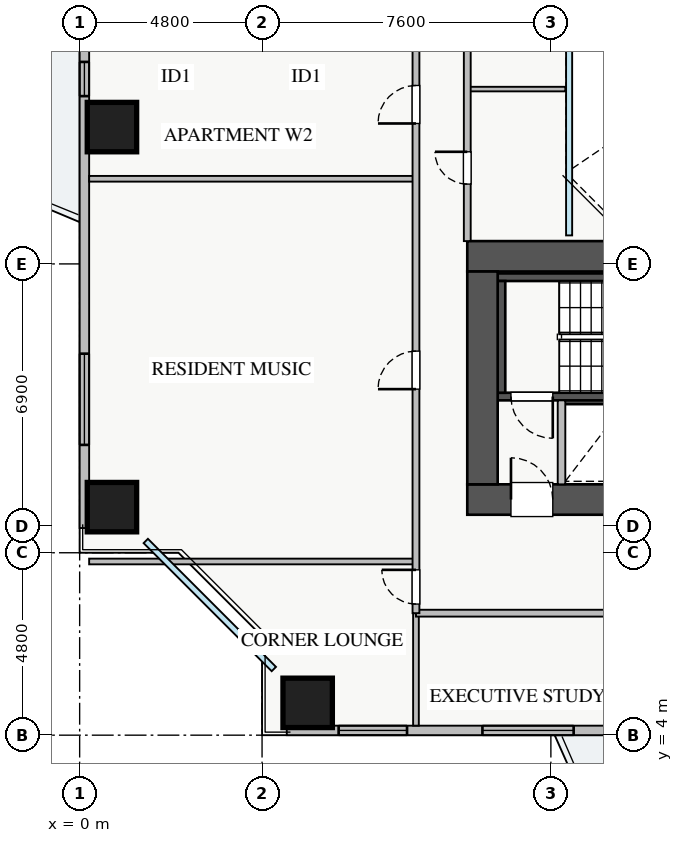
"""IFC4 building model, lengths in metres.
Left out: names, types, materials, properties, quantities, classifications, styles, units other than length and angle.
Written with IfcOpenShell. Run it as: python <this file> out.ifc"""

import sys

from ifc_helpers import new_model, si_unit, direction, frame, frame_2d, origin, origin_2d, place, context, subcontext, project, spatial, rectangle, extrude, source, transform, mapped, element, fill, save


model = new_model("IFC4")
c1 = context("Model", 3, precision=1e-05, world=origin(), true_north=direction((0.0, 1.0)))
c2 = subcontext(c1, "Body", "Model", "MODEL_VIEW")
j1 = project(units=[si_unit("LENGTHUNIT", "METRE"), si_unit("PLANEANGLEUNIT", "RADIAN")], contexts=[c1])
p1 = place(None, origin())
s1 = spatial("IfcSite", under=j1, at=p1, CompositionType="ELEMENT")
p2 = place(p1, origin())
s2 = spatial("IfcBuilding", under=s1, at=p2, CompositionType="ELEMENT")
p3 = place(p2, frame((0.0, 0.0, 82.75)))
s3 = spatial("IfcBuildingStorey", under=s2, at=p3, CompositionType="ELEMENT", Elevation=82.75)
p4 = place(p3, frame((12.68, 12.8, 0.0), z_axis=(0.0, 0.0, 1.0), x_axis=(1.0, 0.0, 0.0)))
e1 = element("IfcWall", 1, at=p4, inside=s3, PredefinedType="SHEAR", context=c2, shape_type="SweptSolid", body=[
    extrude(rectangle(XDim=1.94, YDim=0.18, at=frame_2d((0.97, 0.0))), origin(), (0.0, 0.0, 1.0), 3.07),
])
p5 = place(p3, frame((11.0, 12.91, 0.0), z_axis=(0.0, 0.0, 1.0), x_axis=(1.0, 0.0, 0.0)))
e2 = element("IfcWall", 2, at=p5, inside=s3, PredefinedType="SHEAR", context=c2, shape_type="SweptSolid", body=[
    extrude(rectangle(XDim=7.15, YDim=0.2, at=frame_2d((3.575, 0.0))), origin(), (0.0, 0.0, 1.0), 3.25),
])
p6 = place(p5, frame((0.35, 0.0, 0.0)))
e3 = element("IfcOpeningElement", 3, at=p6, cuts=e2, PredefinedType="OPENING", context=c2, shape_type="SweptSolid", body=[
    extrude(rectangle(XDim=1.1, YDim=2.05, at=frame_2d((0.55, 1.025))), frame((0.0, 0.11, 0.0), z_axis=(0.0, -1.0, 0.0), x_axis=(1.0, 0.0, 0.0)), (0.0, 0.0, 1.0), 0.22),
])
p7 = place(p3, frame((11.0, 16.05, 0.0), z_axis=(0.0, 0.0, 1.0), x_axis=(1.0, 0.0, 0.0)))
e4 = element("IfcWall", 4, at=p7, inside=s3, PredefinedType="SHEAR", context=c2, shape_type="SweptSolid", body=[
    extrude(rectangle(XDim=7.15, YDim=0.2, at=frame_2d((3.575, 0.0))), origin(), (0.0, 0.0, 1.0), 3.25),
])
p8 = place(p3, frame((11.1, 13.01, 0.0), z_axis=(0.0, 0.0, 1.0), x_axis=(0.0, 1.0, 0.0)))
e5 = element("IfcWall", 5, at=p8, inside=s3, PredefinedType="SHEAR", context=c2, shape_type="SweptSolid", body=[
    extrude(rectangle(XDim=2.94, YDim=0.2, at=frame_2d((1.47, 0.0))), origin(), (0.0, 0.0, 1.0), 3.25),
])
p9 = place(p3, frame((10.2, 10.2, 0.0), z_axis=(0.0, 0.0, 1.0), x_axis=(1.0, 0.0, 0.0)))
e6 = element("IfcWall", 6, at=p9, inside=s3, PredefinedType="SHEAR", context=c2, shape_type="SweptSolid", body=[
    extrude(rectangle(XDim=17.6, YDim=0.8, at=frame_2d((8.8, 0.0))), origin(), (0.0, 0.0, 1.0), 3.25),
])
p10 = place(p9, frame((1.15, 0.0, 0.0)))
e7 = element("IfcOpeningElement", 7, at=p10, cuts=e6, PredefinedType="OPENING", context=c2, shape_type="SweptSolid", body=[
    extrude(rectangle(XDim=1.1, YDim=2.05, at=frame_2d((0.55, 1.025))), frame((0.0, 0.41, 0.0), z_axis=(0.0, -1.0, 0.0), x_axis=(1.0, 0.0, 0.0)), (0.0, 0.0, 1.0), 0.82),
])
p11 = place(p9, frame((8.3, 0.0, 0.0)))
e8 = element("IfcOpeningElement", 8, at=p11, cuts=e6, PredefinedType="OPENING", context=c2, shape_type="SweptSolid", body=[
    extrude(rectangle(XDim=1.1, YDim=2.05, at=frame_2d((0.55, 1.025))), frame((0.0, 0.41, 0.0), z_axis=(0.0, -1.0, 0.0), x_axis=(1.0, 0.0, 0.0)), (0.0, 0.0, 1.0), 0.82),
])
p12 = place(p9, frame((10.05, 0.0, 0.0)))
e9 = element("IfcOpeningElement", 9, at=p12, cuts=e6, PredefinedType="OPENING", context=c2, shape_type="SweptSolid", body=[
    extrude(rectangle(XDim=1.1, YDim=2.05, at=frame_2d((0.55, 1.025))), frame((0.0, 0.41, 0.0), z_axis=(0.0, -1.0, 0.0), x_axis=(1.0, 0.0, 0.0)), (0.0, 0.0, 1.0), 0.82),
])
p13 = place(p9, frame((14.74, 0.0, 0.0)))
e10 = element("IfcOpeningElement", 10, at=p13, cuts=e6, PredefinedType="OPENING", context=c2, shape_type="SweptSolid", body=[
    extrude(rectangle(XDim=1.0, YDim=2.05, at=frame_2d((0.5, 1.025))), frame((0.0, 0.41, 0.0), z_axis=(0.0, -1.0, 0.0), x_axis=(1.0, 0.0, 0.0)), (0.0, 0.0, 1.0), 0.82),
])
p14 = place(p9, frame((11.835, 0.0, 0.0)))
e11 = element("IfcOpeningElement", 11, at=p14, cuts=e6, PredefinedType="OPENING", context=c2, shape_type="SweptSolid", body=[
    extrude(rectangle(XDim=1.0, YDim=2.05, at=frame_2d((0.5, 1.025))), frame((0.0, 0.41, 0.0), z_axis=(0.0, -1.0, 0.0), x_axis=(1.0, 0.0, 0.0)), (0.0, 0.0, 1.0), 0.82),
])
p15 = place(p9, frame((13.37, 0.0, 0.0)))
e12 = element("IfcOpeningElement", 12, at=p15, cuts=e6, PredefinedType="OPENING", context=c2, shape_type="SweptSolid", body=[
    extrude(rectangle(XDim=1.0, YDim=2.05, at=frame_2d((0.5, 1.025))), frame((0.0, 0.41, 0.0), z_axis=(0.0, -1.0, 0.0), x_axis=(1.0, 0.0, 0.0)), (0.0, 0.0, 1.0), 0.82),
])
p16 = place(p3, frame((10.2, 16.6, 0.0), z_axis=(0.0, 0.0, 1.0), x_axis=(1.0, 0.0, 0.0)))
e13 = element("IfcWall", 13, at=p16, inside=s3, PredefinedType="SHEAR", context=c2, shape_type="SweptSolid", body=[
    extrude(rectangle(XDim=17.6, YDim=0.8, at=frame_2d((8.8, 0.0))), origin(), (0.0, 0.0, 1.0), 3.25),
])
p17 = place(p3, frame((10.6, 10.6, 0.0), z_axis=(0.0, 0.0, 1.0), x_axis=(0.0, 1.0, 0.0)))
e14 = element("IfcWall", 14, at=p17, inside=s3, PredefinedType="SHEAR", context=c2, shape_type="SweptSolid", body=[
    extrude(rectangle(XDim=5.6, YDim=0.8, at=frame_2d((2.8, 0.0))), origin(), (0.0, 0.0, 1.0), 3.25),
])
m1 = source(origin(), c2, "Body", "SweptSolid", [
    extrude(rectangle(XDim=1.3, YDim=1.3, at=origin_2d()), origin(), (0.0, 0.0, 1.0), 3.25),
])
for number, where, z_axis, x_axis in (
    (15, (6.0, 4.85, 0.0), (0.0, 0.0, 1.0), (1.0, 0.0, 0.0)),
    (16, (0.85, 20.0, 0.0), (0.0, 0.0, 1.0), (1.0, 0.0, 0.0)),
    (17, (0.85, 10.0, 0.0), (0.0, 0.0, 1.0), (1.0, 0.0, 0.0)),
):
    element("IfcColumn", number, at=place(p3, frame(where, z_axis=z_axis, x_axis=x_axis)), inside=s3, PredefinedType="COLUMN", context=c2, shape_type="MappedRepresentation", body=[
        mapped(m1, transform((0.0, 0.0, 0.0), x_axis=(1.0, 0.0, 0.0), y_axis=(0.0, 1.0, 0.0), z_axis=(0.0, 0.0, 1.0), scale=1.0)),
    ])
p18 = place(p3, frame((5.45, 4.125, 0.0), z_axis=(0.0, 0.0, 1.0), x_axis=(1.0, 0.0, 0.0)))
e18 = element("IfcWall", 18, at=p18, inside=s3, PredefinedType="STANDARD", context=c2, shape_type="SweptSolid", body=[
    extrude(rectangle(XDim=27.1, YDim=0.25, at=frame_2d((13.55, 0.0))), origin(), (0.0, 0.0, 1.0), 2.61),
])
p19 = place(p18, frame((14.4, 0.0, 0.0)))
e19 = element("IfcOpeningElement", 19, at=p19, cuts=e18, PredefinedType="OPENING", context=c2, shape_type="SweptSolid", body=[
    extrude(rectangle(XDim=1.2, YDim=2.1, at=frame_2d((0.6, 1.05))), frame((0.0, 0.135, 0.0), z_axis=(0.0, -1.0, 0.0), x_axis=(1.0, 0.0, 0.0)), (0.0, 0.0, 1.0), 0.27),
])
p20 = place(p18, frame((1.365, 0.0, 0.9)))
e20 = element("IfcOpeningElement", 20, at=p20, cuts=e18, PredefinedType="OPENING", context=c2, shape_type="SweptSolid", body=[
    extrude(rectangle(XDim=1.8, YDim=1.5, at=frame_2d((0.9, 0.75))), frame((0.0, 0.135, 0.0), z_axis=(0.0, -1.0, 0.0), x_axis=(1.0, 0.0, 0.0)), (0.0, 0.0, 1.0), 0.27),
])
p21 = place(p18, frame((9.263, 0.0, 0.9)))
e21 = element("IfcOpeningElement", 21, at=p21, cuts=e18, PredefinedType="OPENING", context=c2, shape_type="SweptSolid", body=[
    extrude(rectangle(XDim=1.8, YDim=1.45, at=frame_2d((0.9, 0.725))), frame((0.0, 0.135, 0.0), z_axis=(0.0, -1.0, 0.0), x_axis=(1.0, 0.0, 0.0)), (0.0, 0.0, 1.0), 0.27),
])
p22 = place(p18, frame((18.774, 0.0, 0.9)))
e22 = element("IfcOpeningElement", 22, at=p22, cuts=e18, PredefinedType="OPENING", context=c2, shape_type="SweptSolid", body=[
    extrude(rectangle(XDim=1.5, YDim=1.5, at=frame_2d((0.75, 0.75))), frame((0.0, 0.135, 0.0), z_axis=(0.0, -1.0, 0.0), x_axis=(1.0, 0.0, 0.0)), (0.0, 0.0, 1.0), 0.27),
])
p23 = place(p18, frame((22.663, 0.0, 0.9)))
e23 = element("IfcOpeningElement", 23, at=p23, cuts=e18, PredefinedType="OPENING", context=c2, shape_type="SweptSolid", body=[
    extrude(rectangle(XDim=2.1, YDim=1.48, at=frame_2d((1.05, 0.74))), frame((0.0, 0.135, 0.0), z_axis=(0.0, -1.0, 0.0), x_axis=(1.0, 0.0, 0.0)), (0.0, 0.0, 1.0), 0.27),
])
p24 = place(p18, frame((5.149, 0.0, 0.9)))
e24 = element("IfcOpeningElement", 24, at=p24, cuts=e18, PredefinedType="OPENING", context=c2, shape_type="SweptSolid", body=[
    extrude(rectangle(XDim=2.4, YDim=1.5, at=frame_2d((1.2, 0.75))), frame((0.0, 0.135, 0.0), z_axis=(0.0, -1.0, 0.0), x_axis=(1.0, 0.0, 0.0)), (0.0, 0.0, 1.0), 0.27),
])
p25 = place(p3, frame((0.125, 9.45, 0.0), z_axis=(0.0, 0.0, 1.0), x_axis=(0.0, 1.0, 0.0)))
e25 = element("IfcWall", 25, at=p25, inside=s3, PredefinedType="STANDARD", context=c2, shape_type="SweptSolid", body=[
    extrude(rectangle(XDim=27.1, YDim=0.25, at=frame_2d((13.55, 0.0))), origin(), (0.0, 0.0, 1.0), 2.61),
])
p26 = place(p25, frame((14.4, 0.0, 0.0)))
e26 = element("IfcOpeningElement", 26, at=p26, cuts=e25, PredefinedType="OPENING", context=c2, shape_type="SweptSolid", body=[
    extrude(rectangle(XDim=1.2, YDim=2.1, at=frame_2d((0.6, 1.05))), frame((0.0, 0.135, 0.0), z_axis=(0.0, -1.0, 0.0), x_axis=(1.0, 0.0, 0.0)), (0.0, 0.0, 1.0), 0.27),
])
p27 = place(p25, frame((2.188, 0.0, 0.9)))
e27 = element("IfcOpeningElement", 27, at=p27, cuts=e25, PredefinedType="OPENING", context=c2, shape_type="SweptSolid", body=[
    extrude(rectangle(XDim=2.4, YDim=1.48, at=frame_2d((1.2, 0.74))), frame((0.0, 0.135, 0.0), z_axis=(0.0, -1.0, 0.0), x_axis=(1.0, 0.0, 0.0)), (0.0, 0.0, 1.0), 0.27),
])
p28 = place(p25, frame((23.272, 0.0, 0.9)))
e28 = element("IfcOpeningElement", 28, at=p28, cuts=e25, PredefinedType="OPENING", context=c2, shape_type="SweptSolid", body=[
    extrude(rectangle(XDim=2.1, YDim=1.5, at=frame_2d((1.05, 0.75))), frame((0.0, 0.135, 0.0), z_axis=(0.0, -1.0, 0.0), x_axis=(1.0, 0.0, 0.0)), (0.0, 0.0, 1.0), 0.27),
])
p29 = place(p25, frame((11.365, 0.0, 0.9)))
e29 = element("IfcOpeningElement", 29, at=p29, cuts=e25, PredefinedType="OPENING", context=c2, shape_type="SweptSolid", body=[
    extrude(rectangle(XDim=0.9, YDim=1.2, at=frame_2d((0.45, 0.6))), frame((0.0, 0.135, 0.0), z_axis=(0.0, -1.0, 0.0), x_axis=(1.0, 0.0, 0.0)), (0.0, 0.0, 1.0), 0.27),
])
p30 = place(p25, frame((18.365, 0.0, 0.9)))
e30 = element("IfcOpeningElement", 30, at=p30, cuts=e25, PredefinedType="OPENING", context=c2, shape_type="SweptSolid", body=[
    extrude(rectangle(XDim=0.9, YDim=1.2, at=frame_2d((0.45, 0.6))), frame((0.0, 0.135, 0.0), z_axis=(0.0, -1.0, 0.0), x_axis=(1.0, 0.0, 0.0)), (0.0, 0.0, 1.0), 0.27),
])
p31 = place(p3, frame((12.68, 10.6, 0.0), z_axis=(0.0, 0.0, 1.0), x_axis=(0.0, 1.0, 0.0)))
e31 = element("IfcWall", 31, at=p31, inside=s3, PredefinedType="PARTITIONING", context=c2, shape_type="SweptSolid", body=[
    extrude(rectangle(XDim=2.21, YDim=0.2, at=frame_2d((1.105, 0.0))), origin(), (0.0, 0.0, 1.0), 3.07),
])
p32 = place(p3, frame((8.85, 4.25, 0.0), z_axis=(0.0, 0.0, 1.0), x_axis=(0.0, 1.0, 0.0)))
e32 = element("IfcWall", 32, at=p32, inside=s3, PredefinedType="PARTITIONING", context=c2, shape_type="SweptSolid", body=[
    extrude(rectangle(XDim=2.96, YDim=0.15, at=frame_2d((1.48, 0.0))), origin(), (0.0, 0.0, 1.0), 3.07),
])
p33 = place(p3, frame((8.85, 7.21, 0.0), z_axis=(0.0, 0.0, 1.0), x_axis=(1.0, 0.0, 0.0)))
e33 = element("IfcWall", 33, at=p33, inside=s3, PredefinedType="PARTITIONING", context=c2, shape_type="SweptSolid", body=[
    extrude(rectangle(XDim=23.57, YDim=0.18, at=frame_2d((11.785, 0.0))), origin(), (0.0, 0.0, 1.0), 3.07),
])
p34 = place(p33, frame((5.975, 0.0, 0.0)))
e34 = element("IfcOpeningElement", 34, at=p34, cuts=e33, PredefinedType="OPENING", context=c2, shape_type="SweptSolid", body=[
    extrude(rectangle(XDim=1.0, YDim=2.05, at=frame_2d((0.5, 1.025))), frame((0.0, 0.1, 0.0), z_axis=(0.0, -1.0, 0.0), x_axis=(1.0, 0.0, 0.0)), (0.0, 0.0, 1.0), 0.2),
])
p35 = place(p33, frame((17.76, 0.0, 0.0)))
e35 = element("IfcOpeningElement", 35, at=p35, cuts=e33, PredefinedType="OPENING", context=c2, shape_type="SweptSolid", body=[
    extrude(rectangle(XDim=1.0, YDim=2.05, at=frame_2d((0.5, 1.025))), frame((0.0, 0.1, 0.0), z_axis=(0.0, -1.0, 0.0), x_axis=(1.0, 0.0, 0.0)), (0.0, 0.0, 1.0), 0.2),
])
for number, where, z_axis, x_axis in (
    (36, (0.25, 8.57, 0.0), (0.0, 0.0, 1.0), (1.0, 0.0, 0.0)),
    (37, (0.25, 18.64, 0.0), (0.0, 0.0, 1.0), (1.0, 0.0, 0.0)),
):
    element("IfcWall", number, at=place(p3, frame(where, z_axis=z_axis, x_axis=x_axis)), inside=s3, PredefinedType="PARTITIONING", context=c2, shape_type="SweptSolid", body=[
        extrude(rectangle(XDim=8.6, YDim=0.15, at=frame_2d((4.3, 0.0))), origin(), (0.0, 0.0, 1.0), 3.07),
    ])
p36 = place(p3, frame((8.85, 7.21, 0.0), z_axis=(0.0, 0.0, 1.0), x_axis=(0.0, 1.0, 0.0)))
e38 = element("IfcWall", 38, at=p36, inside=s3, PredefinedType="PARTITIONING", context=c2, shape_type="SweptSolid", body=[
    extrude(rectangle(XDim=31.23, YDim=0.18, at=frame_2d((15.615, 0.0))), origin(), (0.0, 0.0, 1.0), 3.07),
])
p37 = place(p36, frame((30.09, 0.0, 0.0)))
e39 = element("IfcOpeningElement", 39, at=p37, cuts=e38, PredefinedType="OPENING", context=c2, shape_type="SweptSolid", body=[
    extrude(rectangle(XDim=0.9, YDim=2.05, at=frame_2d((0.45, 1.025))), frame((0.0, 0.1, 0.0), z_axis=(0.0, -1.0, 0.0), x_axis=(1.0, 0.0, 0.0)), (0.0, 0.0, 1.0), 0.2),
])
p38 = place(p36, frame((0.24, 0.0, 0.0)))
e40 = element("IfcOpeningElement", 40, at=p38, cuts=e38, PredefinedType="OPENING", context=c2, shape_type="SweptSolid", body=[
    extrude(rectangle(XDim=0.9, YDim=2.05, at=frame_2d((0.45, 1.025))), frame((0.0, 0.1, 0.0), z_axis=(0.0, -1.0, 0.0), x_axis=(1.0, 0.0, 0.0)), (0.0, 0.0, 1.0), 0.2),
])
p39 = place(p36, frame((5.895, 0.0, 0.0)))
e41 = element("IfcOpeningElement", 41, at=p39, cuts=e38, PredefinedType="OPENING", context=c2, shape_type="SweptSolid", body=[
    extrude(rectangle(XDim=1.0, YDim=2.05, at=frame_2d((0.5, 1.025))), frame((0.0, 0.1, 0.0), z_axis=(0.0, -1.0, 0.0), x_axis=(1.0, 0.0, 0.0)), (0.0, 0.0, 1.0), 0.2),
])
p40 = place(p36, frame((12.885, 0.0, 0.0)))
e42 = element("IfcOpeningElement", 42, at=p40, cuts=e38, PredefinedType="OPENING", context=c2, shape_type="SweptSolid", body=[
    extrude(rectangle(XDim=1.0, YDim=2.05, at=frame_2d((0.5, 1.025))), frame((0.0, 0.1, 0.0), z_axis=(0.0, -1.0, 0.0), x_axis=(1.0, 0.0, 0.0)), (0.0, 0.0, 1.0), 0.2),
])
p41 = place(p36, frame((21.96, 0.0, 0.0)))
e43 = element("IfcOpeningElement", 43, at=p41, cuts=e38, PredefinedType="OPENING", context=c2, shape_type="SweptSolid", body=[
    extrude(rectangle(XDim=1.0, YDim=2.05, at=frame_2d((0.5, 1.025))), frame((0.0, 0.1, 0.0), z_axis=(0.0, -1.0, 0.0), x_axis=(1.0, 0.0, 0.0)), (0.0, 0.0, 1.0), 0.2),
])
p42 = place(p3, frame((10.2, 21.0, 0.0), z_axis=(0.0, 0.0, 1.0), x_axis=(1.0, 0.0, 0.0)))
e44 = element("IfcWall", 44, at=p42, inside=s3, PredefinedType="PLUMBINGWALL", context=c2, shape_type="SweptSolid", body=[
    extrude(rectangle(XDim=2.58, YDim=0.12, at=frame_2d((1.29, 0.0))), origin(), (0.0, 0.0, 1.0), 3.07),
])
p43 = place(p3, frame((10.2, 17.0, 0.0), z_axis=(0.0, 0.0, 1.0), x_axis=(0.0, 1.0, 0.0)))
e45 = element("IfcWall", 45, at=p43, inside=s3, PredefinedType="PARTITIONING", context=c2, shape_type="SweptSolid", body=[
    extrude(rectangle(XDim=12.0, YDim=0.18, at=frame_2d((6.0, 0.0))), origin(), (0.0, 0.0, 1.0), 3.07),
])
p44 = place(p43, frame((1.5, 0.0, 0.0)))
e46 = element("IfcOpeningElement", 46, at=p44, cuts=e45, PredefinedType="OPENING", context=c2, shape_type="SweptSolid", body=[
    extrude(rectangle(XDim=0.85, YDim=2.05, at=frame_2d((0.425, 1.025))), frame((0.0, 0.1, 0.0), z_axis=(0.0, -1.0, 0.0), x_axis=(1.0, 0.0, 0.0)), (0.0, 0.0, 1.0), 0.2),
])
p45 = place(p43, frame((6.5, 0.0, 0.0)))
e47 = element("IfcOpeningElement", 47, at=p45, cuts=e45, PredefinedType="OPENING", context=c2, shape_type="SweptSolid", body=[
    extrude(rectangle(XDim=1.0, YDim=2.05, at=frame_2d((0.5, 1.025))), frame((0.0, 0.1, 0.0), z_axis=(0.0, -1.0, 0.0), x_axis=(1.0, 0.0, 0.0)), (0.0, 0.0, 1.0), 0.2),
])
m2 = source(origin(), c2, "Body", "SweptSolid", [
    extrude(rectangle(XDim=1.8, YDim=1.5, at=frame_2d((0.9, 0.75))), frame((0.0, 0.03, 0.0), z_axis=(0.0, -1.0, 0.0), x_axis=(1.0, 0.0, 0.0)), (0.0, 0.0, 1.0), 0.06),
])
p46 = place(p20, origin())
e48 = element("IfcWindow", 48, at=p46, inside=s3, PartitioningType="TRIPLE_PANEL_VERTICAL", PredefinedType="WINDOW", context=c2, shape_type="MappedRepresentation", body=[
    mapped(m2, transform((0.0, 0.0, 0.0), x_axis=(1.0, 0.0, 0.0), y_axis=(0.0, 1.0, 0.0), z_axis=(0.0, 0.0, 1.0), scale=1.0)),
])
fill(e20, e48)
m3 = source(origin(), c2, "Body", "SweptSolid", [
    extrude(rectangle(XDim=2.4, YDim=1.48, at=frame_2d((1.2, 0.74))), frame((0.0, 0.03, 0.0), z_axis=(0.0, -1.0, 0.0), x_axis=(1.0, 0.0, 0.0)), (0.0, 0.0, 1.0), 0.06),
])
p47 = place(p27, origin())
e49 = element("IfcWindow", 49, at=p47, inside=s3, PartitioningType="TRIPLE_PANEL_VERTICAL", PredefinedType="WINDOW", context=c2, shape_type="MappedRepresentation", body=[
    mapped(m3, transform((0.0, 0.0, 0.0), x_axis=(1.0, 0.0, 0.0), y_axis=(0.0, 1.0, 0.0), z_axis=(0.0, 0.0, 1.0), scale=1.0)),
])
fill(e27, e49)
m4 = source(origin(), c2, "Body", "SweptSolid", [
    extrude(rectangle(XDim=1.1, YDim=2.05, at=frame_2d((0.55, 1.025))), frame((0.0, 0.025, 0.0), z_axis=(0.0, -1.0, 0.0), x_axis=(1.0, 0.0, 0.0)), (0.0, 0.0, 1.0), 0.05),
])
p48 = place(p10, origin())
e50 = element("IfcDoor", 50, at=p48, inside=s3, OperationType="SINGLE_SWING_LEFT", PredefinedType="DOOR", context=c2, shape_type="MappedRepresentation", body=[
    mapped(m4, transform((0.0, 0.0, 0.0), x_axis=(1.0, 0.0, 0.0), y_axis=(0.0, 1.0, 0.0), z_axis=(0.0, 0.0, 1.0), scale=1.0)),
])
fill(e7, e50)
p49 = place(p6, frame((1.1, 0.0, 0.0), z_axis=(0.0, 0.0, 1.0), x_axis=(-1.0, 0.0, 0.0)))
e51 = element("IfcDoor", 51, at=p49, inside=s3, OperationType="SINGLE_SWING_RIGHT", PredefinedType="DOOR", context=c2, shape_type="MappedRepresentation", body=[
    mapped(m4, transform((0.0, 0.0, 0.0), x_axis=(1.0, 0.0, 0.0), y_axis=(0.0, 1.0, 0.0), z_axis=(0.0, 0.0, 1.0), scale=1.0)),
])
fill(e3, e51)
m5 = source(origin(), c2, "Body", "SweptSolid", [
    extrude(rectangle(XDim=0.9, YDim=2.05, at=frame_2d((0.45, 1.025))), frame((0.0, 0.025, 0.0), z_axis=(0.0, -1.0, 0.0), x_axis=(1.0, 0.0, 0.0)), (0.0, 0.0, 1.0), 0.05),
])
p50 = place(p38, origin())
e52 = element("IfcDoor", 52, at=p50, inside=s3, OperationType="SINGLE_SWING_RIGHT", PredefinedType="DOOR", context=c2, shape_type="MappedRepresentation", body=[
    mapped(m5, transform((0.0, 0.0, 0.0), x_axis=(1.0, 0.0, 0.0), y_axis=(0.0, 1.0, 0.0), z_axis=(0.0, 0.0, 1.0), scale=1.0)),
])
fill(e40, e52)
m6 = source(origin(), c2, "Body", "SweptSolid", [
    extrude(rectangle(XDim=1.0, YDim=2.05, at=frame_2d((0.5, 1.025))), frame((0.0, 0.025, 0.0), z_axis=(0.0, -1.0, 0.0), x_axis=(1.0, 0.0, 0.0)), (0.0, 0.0, 1.0), 0.05),
])
p51 = place(p39, origin())
e53 = element("IfcDoor", 53, at=p51, inside=s3, OperationType="SINGLE_SWING_LEFT", PredefinedType="DOOR", context=c2, shape_type="MappedRepresentation", body=[
    mapped(m6, transform((0.0, 0.0, 0.0), x_axis=(1.0, 0.0, 0.0), y_axis=(0.0, 1.0, 0.0), z_axis=(0.0, 0.0, 1.0), scale=1.0)),
])
fill(e41, e53)
p52 = place(p40, origin())
e54 = element("IfcDoor", 54, at=p52, inside=s3, OperationType="SINGLE_SWING_LEFT", PredefinedType="DOOR", context=c2, shape_type="MappedRepresentation", body=[
    mapped(m6, transform((0.0, 0.0, 0.0), x_axis=(1.0, 0.0, 0.0), y_axis=(0.0, 1.0, 0.0), z_axis=(0.0, 0.0, 1.0), scale=1.0)),
])
fill(e42, e54)
m7 = source(origin(), c2, "Body", "SweptSolid", [
    extrude(rectangle(XDim=0.85, YDim=2.05, at=frame_2d((0.425, 1.025))), frame((0.0, 0.025, 0.0), z_axis=(0.0, -1.0, 0.0), x_axis=(1.0, 0.0, 0.0)), (0.0, 0.0, 1.0), 0.05),
])
p53 = place(p44, origin())
e55 = element("IfcDoor", 55, at=p53, inside=s3, OperationType="SINGLE_SWING_RIGHT", PredefinedType="DOOR", context=c2, shape_type="MappedRepresentation", body=[
    mapped(m7, transform((0.0, 0.0, 0.0), x_axis=(1.0, 0.0, 0.0), y_axis=(0.0, 1.0, 0.0), z_axis=(0.0, 0.0, 1.0), scale=1.0)),
])
fill(e46, e55)
m8 = source(origin(), c2, "Body", "SweptSolid", [
    extrude(rectangle(XDim=2.4, YDim=1.5, at=frame_2d((1.2, 0.75))), frame((0.0, 0.03, 0.0), z_axis=(0.0, -1.0, 0.0), x_axis=(1.0, 0.0, 0.0)), (0.0, 0.0, 1.0), 0.06),
])
p54 = place(p24, origin())
e56 = element("IfcWindow", 56, at=p54, inside=s3, PartitioningType="TRIPLE_PANEL_VERTICAL", PredefinedType="WINDOW", context=c2, shape_type="MappedRepresentation", body=[
    mapped(m8, transform((0.0, 0.0, 0.0), x_axis=(1.0, 0.0, 0.0), y_axis=(0.0, 1.0, 0.0), z_axis=(0.0, 0.0, 1.0), scale=1.0)),
])
fill(e24, e56)
m9 = source(origin(), c2, "Body", "SweptSolid", [
    extrude(rectangle(XDim=0.9, YDim=1.2, at=frame_2d((0.45, 0.6))), frame((0.0, 0.03, 0.0), z_axis=(0.0, -1.0, 0.0), x_axis=(1.0, 0.0, 0.0)), (0.0, 0.0, 1.0), 0.06),
])
p55 = place(p29, origin())
e57 = element("IfcWindow", 57, at=p55, inside=s3, PartitioningType="SINGLE_PANEL", PredefinedType="WINDOW", context=c2, shape_type="MappedRepresentation", body=[
    mapped(m9, transform((0.0, 0.0, 0.0), x_axis=(1.0, 0.0, 0.0), y_axis=(0.0, 1.0, 0.0), z_axis=(0.0, 0.0, 1.0), scale=1.0)),
])
fill(e29, e57)
save(model, sys.argv[1])
